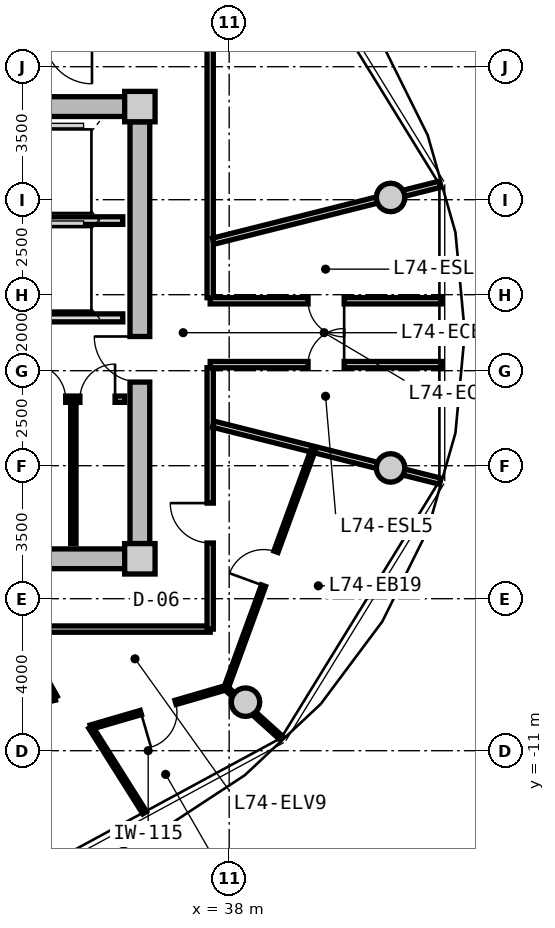
"""IFC4 building model, lengths in metres.
Left out: names, types, materials, properties, quantities, classifications, styles, units other than length and angle.
Written with IfcOpenShell. Run it as: python <this file> out.ifc"""

import sys

from ifc_helpers import new_model, si_unit, direction, frame, frame_2d, origin, origin_2d, place, context, subcontext, project, spatial, rectangle, circle, extrude, source, transform, mapped, element, fill, save


model = new_model("IFC4")
c1 = context("Model", 3, precision=1e-05, world=origin(), true_north=direction((0.0, 1.0)))
c2 = subcontext(c1, "Body", "Model", "MODEL_VIEW")
j1 = project(units=[si_unit("LENGTHUNIT", "METRE"), si_unit("PLANEANGLEUNIT", "RADIAN")], contexts=[c1])
p1 = place(None, origin())
s1 = spatial("IfcSite", under=j1, at=p1, CompositionType="ELEMENT")
p2 = place(p1, origin())
s2 = spatial("IfcBuilding", under=s1, at=p2, CompositionType="ELEMENT")
p3 = place(p2, frame((0.0, 0.0, 238.3)))
s3 = spatial("IfcBuildingStorey", under=s2, at=p3, CompositionType="ELEMENT", Elevation=238.3)
m1 = source(origin(), c2, "Body", "SweptSolid", [
    extrude(rectangle(XDim=0.8, YDim=0.8, at=origin_2d()), origin(), (0.0, 0.0, 1.0), 3.05),
])
for number, where, z_axis, x_axis in (
    (1, (35.65, -5.95, 0.0), (0.0, 0.0, 1.0), (1.0, 0.0, 0.0)),
    (2, (35.65, 5.95, 0.0), (0.0, 0.0, 1.0), (1.0, 0.0, 0.0)),
):
    element("IfcColumn", number, at=place(p3, frame(where, z_axis=z_axis, x_axis=x_axis)), inside=s3, PredefinedType="COLUMN", context=c2, shape_type="MappedRepresentation", body=[
        mapped(m1, transform((0.0, 0.0, 0.0), x_axis=(1.0, 0.0, 0.0), y_axis=(0.0, 1.0, 0.0), z_axis=(0.0, 0.0, 1.0), scale=1.0)),
    ])
m2 = source(origin(), c2, "Body", "SweptSolid", [
    extrude(rectangle(XDim=14.5, YDim=0.52, at=frame_2d((7.25, 0.0))), origin(), (0.0, 0.0, 1.0), 2.81),
])
for number, where, z_axis, x_axis in (
    (3, (20.75, 5.95, 0.0), (0.0, 0.0, 1.0), (1.0, 0.0, 0.0)),
    (4, (35.25, -5.95, 0.0), (0.0, 0.0, 1.0), (-1.0, 0.0, 0.0)),
):
    element("IfcWall", number, at=place(p3, frame(where, z_axis=z_axis, x_axis=x_axis)), inside=s3, PredefinedType="SHEAR", context=c2, shape_type="MappedRepresentation", body=[
        mapped(m2, transform((0.0, 0.0, 0.0), x_axis=(1.0, 0.0, 0.0), y_axis=(0.0, 1.0, 0.0), z_axis=(0.0, 0.0, 1.0), scale=1.0)),
    ])
m3 = source(origin(), c2, "Body", "SweptSolid", [
    extrude(rectangle(XDim=11.1, YDim=0.52, at=frame_2d((5.55, 0.0))), origin(), (0.0, 0.0, 1.0), 2.81),
])
p4 = place(p3, frame((35.65, 5.55, 0.0), z_axis=(0.0, 0.0, 1.0), x_axis=(0.0, -1.0, 0.0)))
e5 = element("IfcWall", 5, at=p4, inside=s3, PredefinedType="SHEAR", context=c2, shape_type="MappedRepresentation", body=[
    mapped(m3, transform((0.0, 0.0, 0.0), x_axis=(1.0, 0.0, 0.0), y_axis=(0.0, 1.0, 0.0), z_axis=(0.0, 0.0, 1.0), scale=1.0)),
])
p5 = place(p4, frame((5.65, 0.0, 0.0)))
e6 = element("IfcOpeningElement", 6, at=p5, cuts=e5, PredefinedType="OPENING", context=c2, shape_type="SweptSolid", body=[
    extrude(rectangle(XDim=1.2, YDim=2.15, at=frame_2d((0.6, 1.075))), frame((0.0, 0.27, 0.0), z_axis=(0.0, -1.0, 0.0), x_axis=(1.0, 0.0, 0.0)), (0.0, 0.0, 1.0), 0.54),
])
m4 = source(origin(), c2, "Body", "SweptSolid", [
    extrude(circle(Radius=0.375, at=origin_2d()), origin(), (0.0, 0.0, 1.0), 3.05),
])
for number, where, z_axis, x_axis in (
    (7, (42.247, 3.559, 0.0), (0.0, 0.0, 1.0), (1.0, 0.0, 0.0)),
    (8, (38.43, -9.723, 0.0), (0.0, 0.0, 1.0), (1.0, 0.0, 0.0)),
    (9, (42.247, -3.559, 0.0), (0.0, 0.0, 1.0), (1.0, 0.0, 0.0)),
):
    element("IfcColumn", number, at=place(p3, frame(where, z_axis=z_axis, x_axis=x_axis)), inside=s3, PredefinedType="COLUMN", context=c2, shape_type="MappedRepresentation", body=[
        mapped(m4, transform((0.0, 0.0, 0.0), x_axis=(1.0, 0.0, 0.0), y_axis=(0.0, 1.0, 0.0), z_axis=(0.0, 0.0, 1.0), scale=1.0)),
    ])
m5 = source(origin(), c2, "Body", "SweptSolid", [
    extrude(rectangle(XDim=3.2, YDim=0.2, at=frame_2d((1.6, 0.0))), origin(), (0.0, 0.0, 1.0), 2.795),
])
p6 = place(p3, frame((32.0, 2.95, 0.0), z_axis=(0.0, 0.0, 1.0), x_axis=(1.0, 0.0, 0.0)))
e10 = element("IfcWall", 10, at=p6, inside=s3, PredefinedType="PARTITIONING", context=c2, shape_type="MappedRepresentation", body=[
    mapped(m5, transform((0.0, 0.0, 0.0), x_axis=(1.0, 0.0, 0.0), y_axis=(0.0, 1.0, 0.0), z_axis=(0.0, 0.0, 1.0), scale=1.0)),
])
m6 = source(origin(), c2, "Body", "SweptSolid", [
    extrude(rectangle(XDim=6.66, YDim=0.21, at=frame_2d((3.33, 0.0))), origin(), (0.0, 0.0, 1.0), 2.795),
])
p7 = place(p3, frame((28.54, 0.39, 0.0), z_axis=(0.0, 0.0, 1.0), x_axis=(1.0, 0.0, 0.0)))
e11 = element("IfcWall", 11, at=p7, inside=s3, PredefinedType="PARTITIONING", context=c2, shape_type="MappedRepresentation", body=[
    mapped(m6, transform((0.0, 0.0, 0.0), x_axis=(1.0, 0.0, 0.0), y_axis=(0.0, 1.0, 0.0), z_axis=(0.0, 0.0, 1.0), scale=1.0)),
])
p8 = place(p7, frame((1.0, 0.0, 0.0)))
e12 = element("IfcOpeningElement", 12, at=p8, cuts=e11, PredefinedType="OPENING", context=c2, shape_type="SweptSolid", body=[
    extrude(rectangle(XDim=1.2, YDim=2.15, at=frame_2d((0.6, 1.075))), frame((0.0, 0.115, 0.0), z_axis=(0.0, -1.0, 0.0), x_axis=(1.0, 0.0, 0.0)), (0.0, 0.0, 1.0), 0.23),
])
m7 = source(origin(), c2, "Body", "SweptSolid", [
    extrude(rectangle(XDim=2.7, YDim=0.165, at=frame_2d((1.35, 0.0))), origin(), (0.0, 0.0, 1.0), 2.795),
])
p9 = place(p3, frame((32.55, -1.75, 0.0), z_axis=(0.0, 0.0, 1.0), x_axis=(1.0, 0.0, 0.0)))
e13 = element("IfcWall", 13, at=p9, inside=s3, PredefinedType="PARTITIONING", context=c2, shape_type="MappedRepresentation", body=[
    mapped(m7, transform((0.0, 0.0, 0.0), x_axis=(1.0, 0.0, 0.0), y_axis=(0.0, 1.0, 0.0), z_axis=(0.0, 0.0, 1.0), scale=1.0)),
])
p10 = place(p9, frame((0.222, 0.0, 0.0)))
e14 = element("IfcOpeningElement", 14, at=p10, cuts=e13, PredefinedType="OPENING", context=c2, shape_type="SweptSolid", body=[
    extrude(rectangle(XDim=0.925, YDim=2.1, at=frame_2d((0.462, 1.05))), frame((0.0, 0.093, 0.0), z_axis=(0.0, -1.0, 0.0), x_axis=(1.0, 0.0, 0.0)), (0.0, 0.0, 1.0), 0.185),
])
p11 = place(p9, frame((1.522, 0.0, 0.0)))
e15 = element("IfcOpeningElement", 15, at=p11, cuts=e13, PredefinedType="OPENING", context=c2, shape_type="SweptSolid", body=[
    extrude(rectangle(XDim=0.925, YDim=2.1, at=frame_2d((0.462, 1.05))), frame((0.0, 0.093, 0.0), z_axis=(0.0, -1.0, 0.0), x_axis=(1.0, 0.0, 0.0)), (0.0, 0.0, 1.0), 0.185),
])
m8 = source(origin(), c2, "Body", "SweptSolid", [
    extrude(rectangle(XDim=3.8, YDim=0.14, at=frame_2d((1.9, 0.0))), origin(), (0.0, 0.0, 1.0), 2.795),
])
p12 = place(p3, frame((33.9, -5.55, 0.0), z_axis=(0.0, 0.0, 1.0), x_axis=(0.0, 1.0, 0.0)))
e16 = element("IfcWall", 16, at=p12, inside=s3, PredefinedType="PARTITIONING", context=c2, shape_type="MappedRepresentation", body=[
    mapped(m8, transform((0.0, 0.0, 0.0), x_axis=(1.0, 0.0, 0.0), y_axis=(0.0, 1.0, 0.0), z_axis=(0.0, 0.0, 1.0), scale=1.0)),
])
m9 = source(origin(), c2, "Body", "SweptSolid", [
    extrude(rectangle(XDim=19.0, YDim=0.165, at=frame_2d((9.5, 0.0))), origin(), (0.0, 0.0, 1.0), 2.795),
])
p13 = place(p3, frame((37.5, -7.8, 0.0), z_axis=(0.0, 0.0, 1.0), x_axis=(-1.0, 0.0, 0.0)))
e17 = element("IfcWall", 17, at=p13, inside=s3, PredefinedType="PARTITIONING", context=c2, shape_type="MappedRepresentation", body=[
    mapped(m9, transform((0.0, 0.0, 0.0), x_axis=(1.0, 0.0, 0.0), y_axis=(0.0, 1.0, 0.0), z_axis=(0.0, 0.0, 1.0), scale=1.0)),
])
p14 = place(p13, frame((12.373, 0.0, 0.0)))
e18 = element("IfcOpeningElement", 18, at=p14, cuts=e17, PredefinedType="OPENING", context=c2, shape_type="SweptSolid", body=[
    extrude(rectangle(XDim=1.25, YDim=2.2, at=frame_2d((0.625, 1.1))), frame((0.0, 0.093, 0.0), z_axis=(0.0, -1.0, 0.0), x_axis=(1.0, 0.0, 0.0)), (0.0, 0.0, 1.0), 0.185),
])
m10 = source(origin(), c2, "Body", "SweptSolid", [
    extrude(rectangle(XDim=6.88, YDim=0.165, at=frame_2d((3.44, 0.0))), origin(), (0.0, 0.0, 1.0), 2.795),
])
p15 = place(p3, frame((37.5, 7.8, 0.0), z_axis=(0.0, 0.0, 1.0), x_axis=(0.0, -1.0, 0.0)))
e19 = element("IfcWall", 19, at=p15, inside=s3, PredefinedType="PARTITIONING", context=c2, shape_type="MappedRepresentation", body=[
    mapped(m10, transform((0.0, 0.0, 0.0), x_axis=(1.0, 0.0, 0.0), y_axis=(0.0, 1.0, 0.0), z_axis=(0.0, 0.0, 1.0), scale=1.0)),
])
p16 = place(p3, frame((37.5, -0.92, 0.0), z_axis=(0.0, 0.0, 1.0), x_axis=(0.0, -1.0, 0.0)))
e20 = element("IfcWall", 20, at=p16, inside=s3, PredefinedType="PARTITIONING", context=c2, shape_type="MappedRepresentation", body=[
    mapped(m10, transform((0.0, 0.0, 0.0), x_axis=(1.0, 0.0, 0.0), y_axis=(0.0, 1.0, 0.0), z_axis=(0.0, 0.0, 1.0), scale=1.0)),
])
p17 = place(p16, frame((3.564, 0.0, 0.0)))
e21 = element("IfcOpeningElement", 21, at=p17, cuts=e20, PredefinedType="OPENING", context=c2, shape_type="SweptSolid", body=[
    extrude(rectangle(XDim=1.05, YDim=2.15, at=frame_2d((0.525, 1.075))), frame((0.0, 0.093, 0.0), z_axis=(0.0, -1.0, 0.0), x_axis=(1.0, 0.0, 0.0)), (0.0, 0.0, 1.0), 0.185),
])
m11 = source(origin(), c2, "Body", "SweptSolid", [
    extrude(rectangle(XDim=6.157, YDim=0.165, at=frame_2d((3.079, 0.0))), origin(), (0.0, 0.0, 1.0), 2.395),
])
for number, where, z_axis, x_axis in (
    (22, (37.58, -2.407, 0.0), (0.0, 0.0, 1.0), (0.97, -0.244, 0.0)),
    (23, (37.58, 2.407, 0.0), (0.0, 0.0, 1.0), (0.97, 0.244, 0.0)),
):
    element("IfcWall", number, at=place(p3, frame(where, z_axis=z_axis, x_axis=x_axis)), inside=s3, PredefinedType="PARTITIONING", context=c2, shape_type="MappedRepresentation", body=[
        mapped(m11, transform((0.0, 0.0, 0.0), x_axis=(1.0, 0.0, 0.0), y_axis=(0.0, 1.0, 0.0), z_axis=(0.0, 0.0, 1.0), scale=1.0)),
    ])
m12 = source(origin(), c2, "Body", "SweptSolid", [
    extrude(rectangle(XDim=6.101, YDim=0.165, at=frame_2d((3.051, 0.0))), origin(), (0.0, 0.0, 1.0), 2.795),
])
p18 = place(p3, frame((37.5, 0.84, 0.0), z_axis=(0.0, 0.0, 1.0), x_axis=(1.0, 0.0, 0.0)))
e24 = element("IfcWall", 24, at=p18, inside=s3, PredefinedType="PARTITIONING", context=c2, shape_type="MappedRepresentation", body=[
    mapped(m12, transform((0.0, 0.0, 0.0), x_axis=(1.0, 0.0, 0.0), y_axis=(0.0, 1.0, 0.0), z_axis=(0.0, 0.0, 1.0), scale=1.0)),
])
p19 = place(p18, frame((2.576, 0.0, 0.0)))
e25 = element("IfcOpeningElement", 25, at=p19, cuts=e24, PredefinedType="OPENING", context=c2, shape_type="SweptSolid", body=[
    extrude(rectangle(XDim=0.95, YDim=2.1, at=frame_2d((0.475, 1.05))), frame((0.0, 0.093, 0.0), z_axis=(0.0, -1.0, 0.0), x_axis=(1.0, 0.0, 0.0)), (0.0, 0.0, 1.0), 0.185),
])
p20 = place(p3, frame((43.601, -0.84, 0.0), z_axis=(0.0, 0.0, 1.0), x_axis=(-1.0, 0.0, 0.0)))
e26 = element("IfcWall", 26, at=p20, inside=s3, PredefinedType="PARTITIONING", context=c2, shape_type="MappedRepresentation", body=[
    mapped(m12, transform((0.0, 0.0, 0.0), x_axis=(1.0, 0.0, 0.0), y_axis=(0.0, 1.0, 0.0), z_axis=(0.0, 0.0, 1.0), scale=1.0)),
])
p21 = place(p20, frame((2.576, 0.0, 0.0)))
e27 = element("IfcOpeningElement", 27, at=p21, cuts=e26, PredefinedType="OPENING", context=c2, shape_type="SweptSolid", body=[
    extrude(rectangle(XDim=0.95, YDim=2.1, at=frame_2d((0.475, 1.05))), frame((0.0, 0.093, 0.0), z_axis=(0.0, -1.0, 0.0), x_axis=(1.0, 0.0, 0.0)), (0.0, 0.0, 1.0), 0.185),
])
m13 = source(origin(), c2, "Body", "SweptSolid", [
    extrude(rectangle(XDim=6.69, YDim=0.115, at=frame_2d((3.345, 0.0))), origin(), (0.0, 0.0, 1.0), 2.795),
])
p22 = place(p3, frame((37.917, -9.352, 0.0), z_axis=(0.0, 0.0, 1.0), x_axis=(0.343693784919, 0.939081776102, 0.0)))
e28 = element("IfcWall", 28, at=p22, inside=s3, PredefinedType="PARTITIONING", context=c2, shape_type="MappedRepresentation", body=[
    mapped(m13, transform((0.0, 0.0, 0.0), x_axis=(1.0, 0.0, 0.0), y_axis=(0.0, 1.0, 0.0), z_axis=(0.0, 0.0, 1.0), scale=1.0)),
])
p23 = place(p22, frame((2.87, 0.0, 0.0)))
e29 = element("IfcOpeningElement", 29, at=p23, cuts=e28, PredefinedType="OPENING", context=c2, shape_type="SweptSolid", body=[
    extrude(rectangle(XDim=0.95, YDim=2.1, at=frame_2d((0.475, 1.05))), frame((0.0, 0.067, 0.0), z_axis=(0.0, -1.0, 0.0), x_axis=(1.0, 0.0, 0.0)), (0.0, 0.0, 1.0), 0.135),
])
m14 = source(origin(), c2, "Body", "SweptSolid", [
    extrude(rectangle(XDim=1.977, YDim=0.115, at=frame_2d((0.989, 0.0))), origin(), (0.0, 0.0, 1.0), 2.395),
])
p24 = place(p3, frame((37.917, -9.352, 0.0), z_axis=(0.0, 0.0, 1.0), x_axis=(0.742064998629, -0.670327933037, 0.0)))
e30 = element("IfcWall", 30, at=p24, inside=s3, PredefinedType="PARTITIONING", context=c2, shape_type="MappedRepresentation", body=[
    mapped(m14, transform((0.0, 0.0, 0.0), x_axis=(1.0, 0.0, 0.0), y_axis=(0.0, 1.0, 0.0), z_axis=(0.0, 0.0, 1.0), scale=1.0)),
])
m15 = source(origin(), c2, "Body", "SweptSolid", [
    extrude(rectangle(XDim=2.035, YDim=0.14, at=frame_2d((1.018, 0.0))), origin(), (0.0, 0.0, 1.0), 2.795),
])
p25 = place(p3, frame((32.415, -7.83, 0.0), z_axis=(0.0, 0.0, 1.0), x_axis=(0.491092509169, -0.871107425888, 0.0)))
e31 = element("IfcWall", 31, at=p25, inside=s3, PredefinedType="PARTITIONING", context=c2, shape_type="MappedRepresentation", body=[
    mapped(m15, transform((0.0, 0.0, 0.0), x_axis=(1.0, 0.0, 0.0), y_axis=(0.0, 1.0, 0.0), z_axis=(0.0, 0.0, 1.0), scale=1.0)),
])
m16 = source(origin(), c2, "Body", "SweptSolid", [
    extrude(rectangle(XDim=2.586, YDim=0.14, at=frame_2d((1.293, 0.0))), origin(), (0.0, 0.0, 1.0), 2.795),
])
p26 = place(p3, frame((33.415, -9.603, 0.0), z_axis=(0.0, 0.0, 1.0), x_axis=(-0.973691298219, -0.227871138526, 0.0)))
e32 = element("IfcWall", 32, at=p26, inside=s3, PredefinedType="PARTITIONING", context=c2, shape_type="MappedRepresentation", body=[
    mapped(m16, transform((0.0, 0.0, 0.0), x_axis=(1.0, 0.0, 0.0), y_axis=(0.0, 1.0, 0.0), z_axis=(0.0, 0.0, 1.0), scale=1.0)),
])
p27 = place(p26, frame((0.833, 0.0, 0.0)))
e33 = element("IfcOpeningElement", 33, at=p27, cuts=e32, PredefinedType="OPENING", context=c2, shape_type="SweptSolid", body=[
    extrude(rectangle(XDim=0.92, YDim=2.1, at=frame_2d((0.46, 1.05))), frame((0.0, 0.08, 0.0), z_axis=(0.0, -1.0, 0.0), x_axis=(1.0, 0.0, 0.0)), (0.0, 0.0, 1.0), 0.16),
])
m17 = source(origin(), c2, "Body", "SweptSolid", [
    extrude(rectangle(XDim=2.662, YDim=0.115, at=frame_2d((1.331, 0.0))), origin(), (0.0, 0.0, 1.0), 2.795),
])
p28 = place(p3, frame((34.355, -10.38, 0.0), z_axis=(0.0, 0.0, 1.0), x_axis=(0.533547747092, -0.845769946009, 0.0)))
e34 = element("IfcWall", 34, at=p28, inside=s3, PredefinedType="PARTITIONING", context=c2, shape_type="MappedRepresentation", body=[
    mapped(m17, transform((0.0, 0.0, 0.0), x_axis=(1.0, 0.0, 0.0), y_axis=(0.0, 1.0, 0.0), z_axis=(0.0, 0.0, 1.0), scale=1.0)),
])
m18 = source(origin(), c2, "Body", "SweptSolid", [
    extrude(rectangle(XDim=3.702, YDim=0.115, at=frame_2d((1.851, 0.0))), origin(), (0.0, 0.0, 1.0), 2.795),
])
p29 = place(p3, frame((34.355, -10.38, 0.0), z_axis=(0.0, 0.0, 1.0), x_axis=(0.960044309887, 0.279848035645, 0.0)))
e35 = element("IfcWall", 35, at=p29, inside=s3, PredefinedType="PARTITIONING", context=c2, shape_type="MappedRepresentation", body=[
    mapped(m18, transform((0.0, 0.0, 0.0), x_axis=(1.0, 0.0, 0.0), y_axis=(0.0, 1.0, 0.0), z_axis=(0.0, 0.0, 1.0), scale=1.0)),
])
p30 = place(p29, frame((1.376, 0.0, 0.0)))
e36 = element("IfcOpeningElement", 36, at=p30, cuts=e35, PredefinedType="OPENING", context=c2, shape_type="SweptSolid", body=[
    extrude(rectangle(XDim=0.95, YDim=2.1, at=frame_2d((0.475, 1.05))), frame((0.0, 0.067, 0.0), z_axis=(0.0, -1.0, 0.0), x_axis=(1.0, 0.0, 0.0)), (0.0, 0.0, 1.0), 0.135),
])
m19 = source(origin(), c2, "Body", "SweptSolid", [
    extrude(rectangle(XDim=1.2, YDim=2.15, at=frame_2d((0.6, 1.075))), frame((0.0, 0.025, 0.0), z_axis=(0.0, -1.0, 0.0), x_axis=(1.0, 0.0, 0.0)), (0.0, 0.0, 1.0), 0.05),
])
p31 = place(p5, frame((1.2, 0.0, 0.0), z_axis=(0.0, 0.0, 1.0), x_axis=(-1.0, 0.0, 0.0)))
e37 = element("IfcDoor", 37, at=p31, inside=s3, OperationType="SINGLE_SWING_RIGHT", PredefinedType="DOOR", context=c2, shape_type="MappedRepresentation", body=[
    mapped(m19, transform((0.0, 0.0, 0.0), x_axis=(1.0, 0.0, 0.0), y_axis=(0.0, 1.0, 0.0), z_axis=(0.0, 0.0, 1.0), scale=1.0)),
])
fill(e6, e37)
m20 = source(origin(), c2, "Body", "SweptSolid", [
    extrude(rectangle(XDim=0.925, YDim=2.1, at=frame_2d((0.462, 1.05))), frame((0.0, 0.025, 0.0), z_axis=(0.0, -1.0, 0.0), x_axis=(1.0, 0.0, 0.0)), (0.0, 0.0, 1.0), 0.05),
])
p32 = place(p10, origin())
e38 = element("IfcDoor", 38, at=p32, inside=s3, OperationType="SINGLE_SWING_LEFT", PredefinedType="DOOR", context=c2, shape_type="MappedRepresentation", body=[
    mapped(m20, transform((0.0, 0.0, 0.0), x_axis=(1.0, 0.0, 0.0), y_axis=(0.0, 1.0, 0.0), z_axis=(0.0, 0.0, 1.0), scale=1.0)),
])
fill(e14, e38)
p33 = place(p11, origin())
e39 = element("IfcDoor", 39, at=p33, inside=s3, OperationType="SINGLE_SWING_RIGHT", PredefinedType="DOOR", context=c2, shape_type="MappedRepresentation", body=[
    mapped(m20, transform((0.0, 0.0, 0.0), x_axis=(1.0, 0.0, 0.0), y_axis=(0.0, 1.0, 0.0), z_axis=(0.0, 0.0, 1.0), scale=1.0)),
])
fill(e15, e39)
m21 = source(origin(), c2, "Body", "SweptSolid", [
    extrude(rectangle(XDim=0.95, YDim=2.1, at=frame_2d((0.475, 1.05))), frame((0.0, 0.025, 0.0), z_axis=(0.0, -1.0, 0.0), x_axis=(1.0, 0.0, 0.0)), (0.0, 0.0, 1.0), 0.05),
])
p34 = place(p21, frame((0.95, 0.0, 0.0), z_axis=(0.0, 0.0, 1.0), x_axis=(-1.0, 0.0, 0.0)))
e40 = element("IfcDoor", 40, at=p34, inside=s3, OperationType="SINGLE_SWING_RIGHT", PredefinedType="DOOR", context=c2, shape_type="MappedRepresentation", body=[
    mapped(m21, transform((0.0, 0.0, 0.0), x_axis=(1.0, 0.0, 0.0), y_axis=(0.0, 1.0, 0.0), z_axis=(0.0, 0.0, 1.0), scale=1.0)),
])
fill(e27, e40)
p35 = place(p19, frame((0.95, 0.0, 0.0), z_axis=(0.0, 0.0, 1.0), x_axis=(-1.0, 0.0, 0.0)))
e41 = element("IfcDoor", 41, at=p35, inside=s3, OperationType="SINGLE_SWING_LEFT", PredefinedType="DOOR", context=c2, shape_type="MappedRepresentation", body=[
    mapped(m21, transform((0.0, 0.0, 0.0), x_axis=(1.0, 0.0, 0.0), y_axis=(0.0, 1.0, 0.0), z_axis=(0.0, 0.0, 1.0), scale=1.0)),
])
fill(e25, e41)
m22 = source(origin(), c2, "Body", "SweptSolid", [
    extrude(rectangle(XDim=1.05, YDim=2.15, at=frame_2d((0.525, 1.075))), frame((0.0, 0.025, 0.0), z_axis=(0.0, -1.0, 0.0), x_axis=(1.0, 0.0, 0.0)), (0.0, 0.0, 1.0), 0.05),
])
p36 = place(p17, frame((1.05, 0.0, 0.0), z_axis=(0.0, 0.0, 1.0), x_axis=(-1.0, 0.0, 0.0)))
e42 = element("IfcDoor", 42, at=p36, inside=s3, OperationType="SINGLE_SWING_RIGHT", PredefinedType="DOOR", context=c2, shape_type="MappedRepresentation", body=[
    mapped(m22, transform((0.0, 0.0, 0.0), x_axis=(1.0, 0.0, 0.0), y_axis=(0.0, 1.0, 0.0), z_axis=(0.0, 0.0, 1.0), scale=1.0)),
])
fill(e21, e42)
p37 = place(p30, frame((0.95, 0.0, 0.0), z_axis=(0.0, 0.0, 1.0), x_axis=(-1.0, 0.0, 0.0)))
e43 = element("IfcDoor", 43, at=p37, inside=s3, OperationType="SINGLE_SWING_RIGHT", PredefinedType="DOOR", context=c2, shape_type="MappedRepresentation", body=[
    mapped(m21, transform((0.0, 0.0, 0.0), x_axis=(1.0, 0.0, 0.0), y_axis=(0.0, 1.0, 0.0), z_axis=(0.0, 0.0, 1.0), scale=1.0)),
])
fill(e36, e43)
p38 = place(p23, origin())
e44 = element("IfcDoor", 44, at=p38, inside=s3, OperationType="SINGLE_SWING_LEFT", PredefinedType="DOOR", context=c2, shape_type="MappedRepresentation", body=[
    mapped(m21, transform((0.0, 0.0, 0.0), x_axis=(1.0, 0.0, 0.0), y_axis=(0.0, 1.0, 0.0), z_axis=(0.0, 0.0, 1.0), scale=1.0)),
])
fill(e29, e44)
save(model, sys.argv[1])
